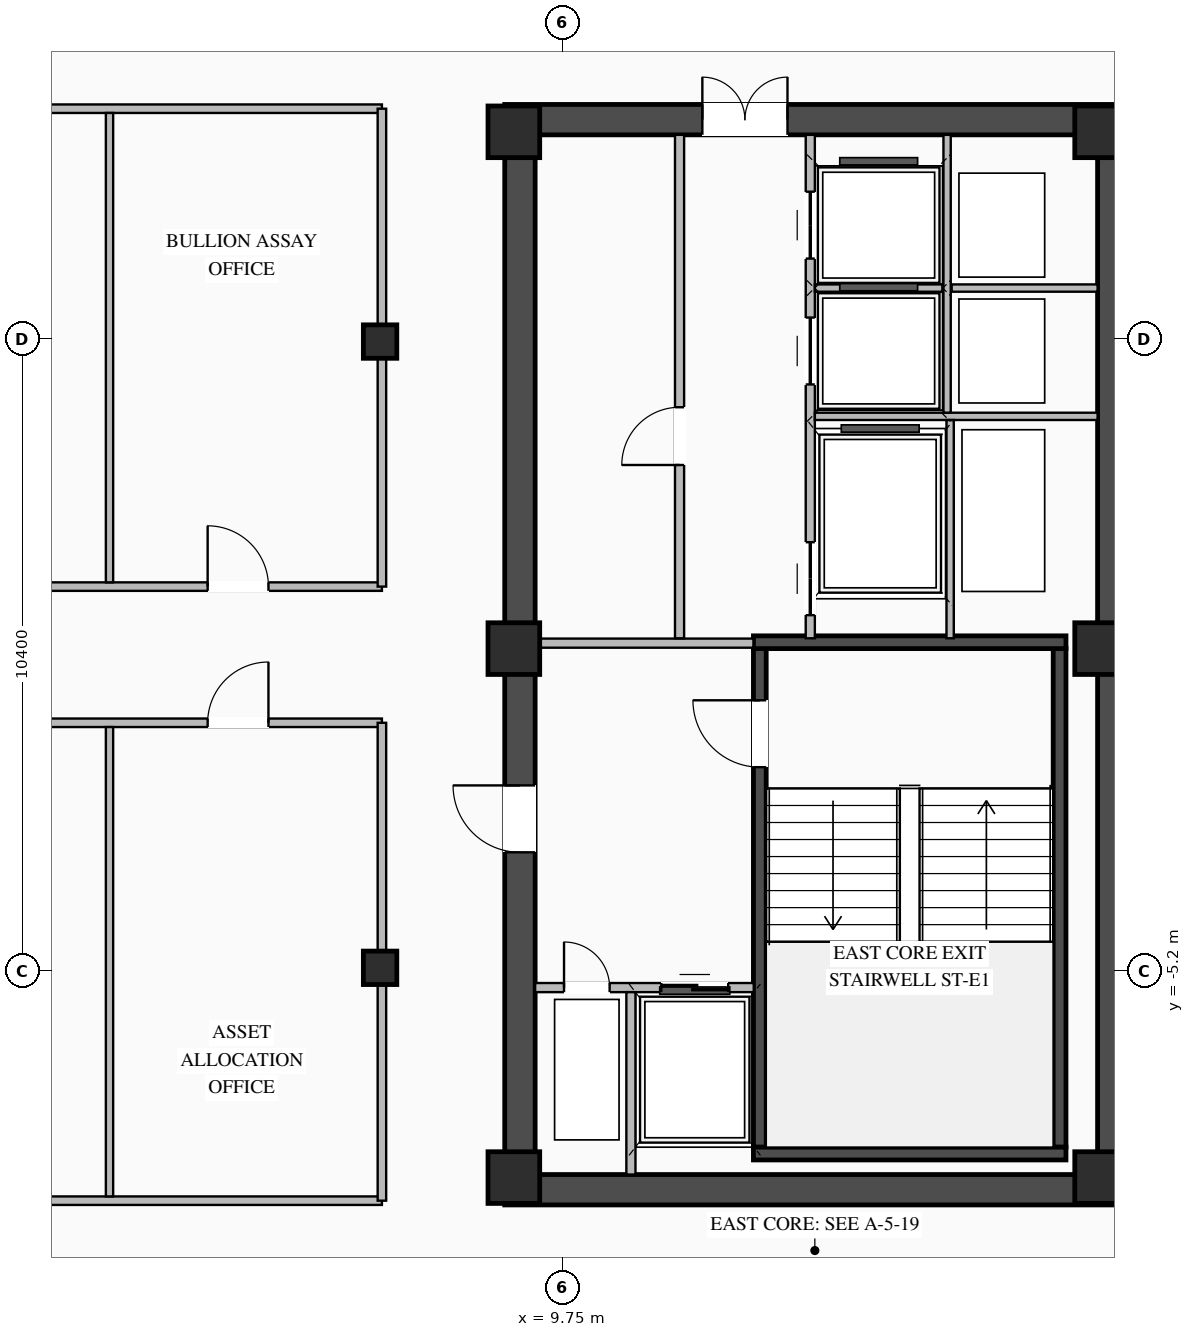
"""IFC4 building model, lengths in metres.
Left out: names, types, materials, properties, quantities, classifications, styles, units other than length and angle.
Written with IfcOpenShell. Run it as: python <this file> out.ifc"""

import sys

from ifc_helpers import new_model, si_unit, direction, frame, frame_2d, origin, origin_2d, place, context, subcontext, project, spatial, rectangle, i_section, extrude, element, fill, save


model = new_model("IFC4")
c1 = context("Model", 3, precision=1e-05, world=origin(), true_north=direction((0.0, 1.0)))
c2 = subcontext(c1, "Body", "Model", "MODEL_VIEW")
j1 = project(units=[si_unit("LENGTHUNIT", "METRE"), si_unit("PLANEANGLEUNIT", "RADIAN")], contexts=[c1])
p1 = place(None, origin())
s1 = spatial("IfcSite", under=j1, at=p1, CompositionType="ELEMENT")
p2 = place(p1, origin())
s2 = spatial("IfcBuilding", under=s1, at=p2, CompositionType="ELEMENT")
p3 = place(p2, frame((0.0, 0.0, 229.2)))
s3 = spatial("IfcBuildingStorey", under=s2, at=p3, CompositionType="ELEMENT", Elevation=229.2)
p4 = place(p3, frame((8.8, -8.8, 0.0), z_axis=(0.0, 0.0, 1.0), x_axis=(1.0, 0.0, 0.0)))
e1 = element("IfcWall", 1, at=p4, inside=s3, PredefinedType="SHEAR", context=c2, shape_type="SweptSolid", body=[
    extrude(rectangle(XDim=10.25, YDim=0.5, at=frame_2d((5.125, 0.0))), origin(), (0.0, 0.0, 1.0), 3.27),
])
p5 = place(p3, frame((8.8, 8.8, 0.0), z_axis=(0.0, 0.0, 1.0), x_axis=(1.0, 0.0, 0.0)))
e2 = element("IfcWall", 2, at=p5, inside=s3, PredefinedType="SHEAR", context=c2, shape_type="SweptSolid", body=[
    extrude(rectangle(XDim=10.25, YDim=0.5, at=frame_2d((5.125, 0.0))), origin(), (0.0, 0.0, 1.0), 3.27),
])
p6 = place(p5, frame((3.25, 0.0, 0.0)))
e3 = element("IfcOpeningElement", 3, at=p6, cuts=e2, PredefinedType="OPENING", context=c2, shape_type="SweptSolid", body=[
    extrude(rectangle(XDim=1.4, YDim=2.05, at=frame_2d((0.7, 1.025))), frame((0.0, 0.26, 0.0), z_axis=(0.0, -1.0, 0.0), x_axis=(1.0, 0.0, 0.0)), (0.0, 0.0, 1.0), 0.52),
])
p7 = place(p3, frame((9.05, -8.55, 0.0), z_axis=(0.0, 0.0, 1.0), x_axis=(0.0, 1.0, 0.0)))
e4 = element("IfcWall", 4, at=p7, inside=s3, PredefinedType="SHEAR", context=c2, shape_type="SweptSolid", body=[
    extrude(rectangle(XDim=17.1, YDim=0.5, at=frame_2d((8.55, 0.0))), origin(), (0.0, 0.0, 1.0), 3.27),
])
p8 = place(p7, frame((5.3, 0.0, 0.0)))
e5 = element("IfcOpeningElement", 5, at=p8, cuts=e4, PredefinedType="OPENING", context=c2, shape_type="SweptSolid", body=[
    extrude(rectangle(XDim=1.1, YDim=2.08, at=frame_2d((0.55, 1.04))), frame((0.0, 0.26, 0.0), z_axis=(0.0, -1.0, 0.0), x_axis=(1.0, 0.0, 0.0)), (0.0, 0.0, 1.0), 0.52),
])
p9 = place(p3, frame((18.8, -8.55, 0.0), z_axis=(0.0, 0.0, 1.0), x_axis=(0.0, 1.0, 0.0)))
e6 = element("IfcWall", 6, at=p9, inside=s3, PredefinedType="SHEAR", context=c2, shape_type="SweptSolid", body=[
    extrude(rectangle(XDim=17.1, YDim=0.5, at=frame_2d((8.55, 0.0))), origin(), (0.0, 0.0, 1.0), 3.27),
])
p10 = place(p3, frame((12.995, -8.1, 0.0), z_axis=(0.0, 0.0, 1.0), x_axis=(0.0, 1.0, 0.0)))
e7 = element("IfcWall", 7, at=p10, inside=s3, PredefinedType="SHEAR", context=c2, shape_type="SweptSolid", body=[
    extrude(rectangle(XDim=8.2, YDim=0.21, at=frame_2d((4.1, 0.0))), origin(), (0.0, 0.0, 1.0), 3.27),
])
p11 = place(p10, frame((6.25, 0.0, 0.0)))
e8 = element("IfcOpeningElement", 8, at=p11, cuts=e7, PredefinedType="OPENING", context=c2, shape_type="SweptSolid", body=[
    extrude(rectangle(XDim=1.1, YDim=2.15, at=frame_2d((0.55, 1.075))), frame((0.0, 0.115, 0.0), z_axis=(0.0, -1.0, 0.0), x_axis=(1.0, 0.0, 0.0)), (0.0, 0.0, 1.0), 0.23),
])
p12 = place(p3, frame((17.925, -8.1, 0.0), z_axis=(0.0, 0.0, 1.0), x_axis=(0.0, 1.0, 0.0)))
e9 = element("IfcWall", 9, at=p12, inside=s3, PredefinedType="SHEAR", context=c2, shape_type="SweptSolid", body=[
    extrude(rectangle(XDim=8.2, YDim=0.21, at=frame_2d((4.1, 0.0))), origin(), (0.0, 0.0, 1.0), 3.27),
])
for number, where, z_axis, x_axis in (
    (10, (12.89, -8.205, 0.0), (0.0, 0.0, 1.0), (1.0, 0.0, 0.0)),
    (11, (18.03, 0.205, 0.0), (0.0, 0.0, 1.0), (-1.0, 0.0, 0.0)),
):
    element("IfcWall", number, at=place(p3, frame(where, z_axis=z_axis, x_axis=x_axis)), inside=s3, PredefinedType="SHEAR", context=c2, shape_type="SweptSolid", body=[
        extrude(rectangle(XDim=5.14, YDim=0.21, at=frame_2d((2.57, 0.0))), origin(), (0.0, 0.0, 1.0), 3.27),
    ])
for number, where, z_axis, x_axis in (
    (12, (8.95, -8.6, 0.0), (0.0, 0.0, 1.0), (1.0, 0.0, 0.0)),
    (13, (8.95, 0.1, 0.0), (0.0, 0.0, 1.0), (1.0, 0.0, 0.0)),
    (14, (8.95, 8.6, 0.0), (0.0, 0.0, 1.0), (1.0, 0.0, 0.0)),
    (15, (18.6, -8.6, 0.0), (0.0, 0.0, 1.0), (1.0, 0.0, 0.0)),
    (16, (18.6, 0.1, 0.0), (0.0, 0.0, 1.0), (1.0, 0.0, 0.0)),
    (17, (18.6, 8.6, 0.0), (0.0, 0.0, 1.0), (1.0, 0.0, 0.0)),
):
    element("IfcColumn", number, at=place(p3, frame(where, z_axis=z_axis, x_axis=x_axis)), inside=s3, PredefinedType="COLUMN", context=c2, shape_type="SweptSolid", body=[
        extrude(rectangle(XDim=0.85, YDim=0.85, at=origin_2d()), origin(), (0.0, 0.0, 1.0), 3.45),
    ])
for number, where, z_axis, x_axis in (
    (18, (6.75, -5.15, 0.0), (0.0, 0.0, 1.0), (1.0, 0.0, 0.0)),
    (19, (6.75, 5.15, 0.0), (0.0, 0.0, 1.0), (1.0, 0.0, 0.0)),
):
    element("IfcColumn", number, at=place(p3, frame(where, z_axis=z_axis, x_axis=x_axis)), inside=s3, PredefinedType="COLUMN", context=c2, shape_type="SweptSolid", body=[
        extrude(i_section(OverallWidth=0.55, OverallDepth=0.55, WebThickness=0.024, FlangeThickness=0.036, at=origin_2d()), origin(), (0.0, 0.0, 1.0), 3.45),
    ])
p13 = place(p3, frame((9.3, -5.475, 0.0), z_axis=(0.0, 0.0, 1.0), x_axis=(1.0, 0.0, 0.0)))
e20 = element("IfcWall", 20, at=p13, inside=s3, PredefinedType="STANDARD", context=c2, shape_type="SweptSolid", body=[
    extrude(rectangle(XDim=3.595, YDim=0.15, at=frame_2d((1.797, 0.0))), origin(), (0.0, 0.0, 1.0), 3.25),
])
p14 = place(p13, frame((2.075, 0.0, 0.0)))
e21 = element("IfcOpeningElement", 21, at=p14, cuts=e20, PredefinedType="OPENING", context=c2, shape_type="SweptSolid", body=[
    extrude(rectangle(XDim=1.1, YDim=2.15, at=frame_2d((0.55, 1.075))), frame((0.0, 0.085, 0.0), z_axis=(0.0, -1.0, 0.0), x_axis=(1.0, 0.0, 0.0)), (0.0, 0.0, 1.0), 0.17),
])
p15 = place(p13, frame((0.475, 0.0, 0.0)))
e22 = element("IfcOpeningElement", 22, at=p15, cuts=e20, PredefinedType="OPENING", context=c2, shape_type="SweptSolid", body=[
    extrude(rectangle(XDim=0.75, YDim=2.05, at=frame_2d((0.375, 1.025))), frame((0.0, 0.085, 0.0), z_axis=(0.0, -1.0, 0.0), x_axis=(1.0, 0.0, 0.0)), (0.0, 0.0, 1.0), 0.17),
])
p16 = place(p3, frame((10.875, -8.55, 0.0), z_axis=(0.0, 0.0, 1.0), x_axis=(0.0, 1.0, 0.0)))
e23 = element("IfcWall", 23, at=p16, inside=s3, PredefinedType="STANDARD", context=c2, shape_type="SweptSolid", body=[
    extrude(rectangle(XDim=3.0, YDim=0.15, at=frame_2d((1.5, 0.0))), origin(), (0.0, 0.0, 1.0), 3.25),
])
p17 = place(p3, frame((9.3, 0.19, 0.0), z_axis=(0.0, 0.0, 1.0), x_axis=(1.0, 0.0, 0.0)))
e24 = element("IfcWall", 24, at=p17, inside=s3, PredefinedType="STANDARD", context=c2, shape_type="SweptSolid", body=[
    extrude(rectangle(XDim=3.59, YDim=0.15, at=frame_2d((1.795, 0.0))), origin(), (0.0, 0.0, 1.0), 2.645),
])
p18 = place(p3, frame((11.675, 0.27, 0.0), z_axis=(0.0, 0.0, 1.0), x_axis=(0.0, 1.0, 0.0)))
e25 = element("IfcWall", 25, at=p18, inside=s3, PredefinedType="STANDARD", context=c2, shape_type="SweptSolid", body=[
    extrude(rectangle(XDim=8.28, YDim=0.15, at=frame_2d((4.14, 0.0))), origin(), (0.0, 0.0, 1.0), 3.25),
])
p19 = place(p18, frame((2.85, 0.0, 0.0)))
e26 = element("IfcOpeningElement", 26, at=p19, cuts=e25, PredefinedType="OPENING", context=c2, shape_type="SweptSolid", body=[
    extrude(rectangle(XDim=0.95, YDim=2.05, at=frame_2d((0.475, 1.025))), frame((0.0, 0.085, 0.0), z_axis=(0.0, -1.0, 0.0), x_axis=(1.0, 0.0, 0.0)), (0.0, 0.0, 1.0), 0.17),
])
p20 = place(p3, frame((13.825, 0.27, 0.0), z_axis=(0.0, 0.0, 1.0), x_axis=(0.0, 1.0, 0.0)))
e27 = element("IfcWall", 27, at=p20, inside=s3, PredefinedType="STANDARD", context=c2, shape_type="SweptSolid", body=[
    extrude(rectangle(XDim=8.28, YDim=0.15, at=frame_2d((4.14, 0.0))), origin(), (0.0, 0.0, 1.0), 3.25),
])
p21 = place(p20, frame((4.175, 0.0, 0.0)))
e28 = element("IfcOpeningElement", 28, at=p21, cuts=e27, PredefinedType="OPENING", context=c2, shape_type="SweptSolid", body=[
    extrude(rectangle(XDim=1.1, YDim=2.1, at=frame_2d((0.55, 1.05))), frame((0.0, 0.085, 0.0), z_axis=(0.0, -1.0, 0.0), x_axis=(1.0, 0.0, 0.0)), (0.0, 0.0, 1.0), 0.17),
])
p22 = place(p20, frame((6.245, 0.0, 0.0)))
e29 = element("IfcOpeningElement", 29, at=p22, cuts=e27, PredefinedType="OPENING", context=c2, shape_type="SweptSolid", body=[
    extrude(rectangle(XDim=1.1, YDim=2.1, at=frame_2d((0.55, 1.05))), frame((0.0, 0.085, 0.0), z_axis=(0.0, -1.0, 0.0), x_axis=(1.0, 0.0, 0.0)), (0.0, 0.0, 1.0), 0.17),
])
p23 = place(p20, frame((0.38, 0.0, 0.0)))
e30 = element("IfcOpeningElement", 30, at=p23, cuts=e27, PredefinedType="OPENING", context=c2, shape_type="SweptSolid", body=[
    extrude(rectangle(XDim=1.2, YDim=2.1, at=frame_2d((0.6, 1.05))), frame((0.0, 0.085, 0.0), z_axis=(0.0, -1.0, 0.0), x_axis=(1.0, 0.0, 0.0)), (0.0, 0.0, 1.0), 0.17),
])
p24 = place(p3, frame((13.9, 3.92, 0.0), z_axis=(0.0, 0.0, 1.0), x_axis=(1.0, 0.0, 0.0)))
e31 = element("IfcWall", 31, at=p24, inside=s3, PredefinedType="STANDARD", context=c2, shape_type="SweptSolid", body=[
    extrude(rectangle(XDim=4.65, YDim=0.12, at=frame_2d((2.325, 0.0))), origin(), (0.0, 0.0, 1.0), 3.25),
])
p25 = place(p3, frame((16.15, 6.03, 0.0), z_axis=(0.0, 0.0, 1.0), x_axis=(1.0, 0.0, 0.0)))
e32 = element("IfcWall", 32, at=p25, inside=s3, PredefinedType="STANDARD", context=c2, shape_type="SweptSolid", body=[
    extrude(rectangle(XDim=2.4, YDim=0.12, at=frame_2d((1.2, 0.0))), origin(), (0.0, 0.0, 1.0), 3.25),
])
p26 = place(p3, frame((16.075, 3.98, 0.0), z_axis=(0.0, 0.0, 1.0), x_axis=(0.0, 1.0, 0.0)))
e33 = element("IfcWall", 33, at=p26, inside=s3, PredefinedType="STANDARD", context=c2, shape_type="SweptSolid", body=[
    extrude(rectangle(XDim=4.57, YDim=0.12, at=frame_2d((2.285, 0.0))), origin(), (0.0, 0.0, 1.0), 3.25),
])
p27 = place(p3, frame((13.9, 6.03, 0.0), z_axis=(0.0, 0.0, 1.0), x_axis=(1.0, 0.0, 0.0)))
e34 = element("IfcWall", 34, at=p27, inside=s3, PredefinedType="STANDARD", context=c2, shape_type="SweptSolid", body=[
    extrude(rectangle(XDim=2.1, YDim=0.12, at=frame_2d((1.05, 0.0))), origin(), (0.0, 0.0, 1.0), 3.25),
])
p28 = place(p3, frame((16.125, 0.27, 0.0), z_axis=(0.0, 0.0, 1.0), x_axis=(0.0, 1.0, 0.0)))
e35 = element("IfcWall", 35, at=p28, inside=s3, PredefinedType="STANDARD", context=c2, shape_type="SweptSolid", body=[
    extrude(rectangle(XDim=3.59, YDim=0.12, at=frame_2d((1.795, 0.0))), origin(), (0.0, 0.0, 1.0), 3.25),
])
p29 = place(p3, frame((-6.78, 1.12, 0.0), z_axis=(0.0, 0.0, 1.0), x_axis=(1.0, 0.0, 0.0)))
e36 = element("IfcWall", 36, at=p29, inside=s3, PredefinedType="STANDARD", context=c2, shape_type="SweptSolid", body=[
    extrude(rectangle(XDim=13.56, YDim=0.14, at=frame_2d((6.78, 0.0))), origin(), (0.0, 0.0, 1.0), 3.25),
])
p30 = place(p29, frame((1.866, 0.0, 0.0)))
e37 = element("IfcOpeningElement", 37, at=p30, cuts=e36, PredefinedType="OPENING", context=c2, shape_type="SweptSolid", body=[
    extrude(rectangle(XDim=1.0, YDim=2.08, at=frame_2d((0.5, 1.04))), frame((0.0, 0.08, 0.0), z_axis=(0.0, -1.0, 0.0), x_axis=(1.0, 0.0, 0.0)), (0.0, 0.0, 1.0), 0.16),
])
p31 = place(p29, frame((6.28, 0.0, 0.0)))
e38 = element("IfcOpeningElement", 38, at=p31, cuts=e36, PredefinedType="OPENING", context=c2, shape_type="SweptSolid", body=[
    extrude(rectangle(XDim=1.0, YDim=2.08, at=frame_2d((0.5, 1.04))), frame((0.0, 0.08, 0.0), z_axis=(0.0, -1.0, 0.0), x_axis=(1.0, 0.0, 0.0)), (0.0, 0.0, 1.0), 0.16),
])
p32 = place(p29, frame((10.694, 0.0, 0.0)))
e39 = element("IfcOpeningElement", 39, at=p32, cuts=e36, PredefinedType="OPENING", context=c2, shape_type="SweptSolid", body=[
    extrude(rectangle(XDim=1.0, YDim=2.08, at=frame_2d((0.5, 1.04))), frame((0.0, 0.08, 0.0), z_axis=(0.0, -1.0, 0.0), x_axis=(1.0, 0.0, 0.0)), (0.0, 0.0, 1.0), 0.16),
])
p33 = place(p3, frame((-6.78, 8.98, 0.0), z_axis=(0.0, 0.0, 1.0), x_axis=(1.0, 0.0, 0.0)))
e40 = element("IfcWall", 40, at=p33, inside=s3, PredefinedType="STANDARD", context=c2, shape_type="SweptSolid", body=[
    extrude(rectangle(XDim=13.56, YDim=0.14, at=frame_2d((6.78, 0.0))), origin(), (0.0, 0.0, 1.0), 3.25),
])
p34 = place(p3, frame((6.78, 1.12, 0.0), z_axis=(0.0, 0.0, 1.0), x_axis=(0.0, 1.0, 0.0)))
e41 = element("IfcWall", 41, at=p34, inside=s3, PredefinedType="STANDARD", context=c2, shape_type="SweptSolid", body=[
    extrude(rectangle(XDim=7.86, YDim=0.14, at=frame_2d((3.93, 0.0))), origin(), (0.0, 0.0, 1.0), 2.645),
])
p35 = place(p3, frame((2.3, 1.19, 0.0), z_axis=(0.0, 0.0, 1.0), x_axis=(0.0, 1.0, 0.0)))
e42 = element("IfcWall", 42, at=p35, inside=s3, PredefinedType="STANDARD", context=c2, shape_type="SweptSolid", body=[
    extrude(rectangle(XDim=7.72, YDim=0.12, at=frame_2d((3.86, 0.0))), origin(), (0.0, 0.0, 1.0), 3.25),
])
p36 = place(p3, frame((-6.78, -1.12, 0.0), z_axis=(0.0, 0.0, 1.0), x_axis=(1.0, 0.0, 0.0)))
e43 = element("IfcWall", 43, at=p36, inside=s3, PredefinedType="STANDARD", context=c2, shape_type="SweptSolid", body=[
    extrude(rectangle(XDim=13.56, YDim=0.14, at=frame_2d((6.78, 0.0))), origin(), (0.0, 0.0, 1.0), 3.25),
])
p37 = place(p36, frame((1.866, 0.0, 0.0)))
e44 = element("IfcOpeningElement", 44, at=p37, cuts=e43, PredefinedType="OPENING", context=c2, shape_type="SweptSolid", body=[
    extrude(rectangle(XDim=1.0, YDim=2.08, at=frame_2d((0.5, 1.04))), frame((0.0, 0.08, 0.0), z_axis=(0.0, -1.0, 0.0), x_axis=(1.0, 0.0, 0.0)), (0.0, 0.0, 1.0), 0.16),
])
p38 = place(p36, frame((6.28, 0.0, 0.0)))
e45 = element("IfcOpeningElement", 45, at=p38, cuts=e43, PredefinedType="OPENING", context=c2, shape_type="SweptSolid", body=[
    extrude(rectangle(XDim=1.0, YDim=2.08, at=frame_2d((0.5, 1.04))), frame((0.0, 0.08, 0.0), z_axis=(0.0, -1.0, 0.0), x_axis=(1.0, 0.0, 0.0)), (0.0, 0.0, 1.0), 0.16),
])
p39 = place(p36, frame((10.694, 0.0, 0.0)))
e46 = element("IfcOpeningElement", 46, at=p39, cuts=e43, PredefinedType="OPENING", context=c2, shape_type="SweptSolid", body=[
    extrude(rectangle(XDim=1.0, YDim=2.08, at=frame_2d((0.5, 1.04))), frame((0.0, 0.08, 0.0), z_axis=(0.0, -1.0, 0.0), x_axis=(1.0, 0.0, 0.0)), (0.0, 0.0, 1.0), 0.16),
])
p40 = place(p3, frame((-6.78, -8.98, 0.0), z_axis=(0.0, 0.0, 1.0), x_axis=(1.0, 0.0, 0.0)))
e47 = element("IfcWall", 47, at=p40, inside=s3, PredefinedType="STANDARD", context=c2, shape_type="SweptSolid", body=[
    extrude(rectangle(XDim=13.56, YDim=0.14, at=frame_2d((6.78, 0.0))), origin(), (0.0, 0.0, 1.0), 3.25),
])
p41 = place(p3, frame((6.78, -8.98, 0.0), z_axis=(0.0, 0.0, 1.0), x_axis=(0.0, 1.0, 0.0)))
e48 = element("IfcWall", 48, at=p41, inside=s3, PredefinedType="STANDARD", context=c2, shape_type="SweptSolid", body=[
    extrude(rectangle(XDim=7.86, YDim=0.14, at=frame_2d((3.93, 0.0))), origin(), (0.0, 0.0, 1.0), 2.645),
])
p42 = place(p3, frame((2.3, -8.91, 0.0), z_axis=(0.0, 0.0, 1.0), x_axis=(0.0, 1.0, 0.0)))
e49 = element("IfcWall", 49, at=p42, inside=s3, PredefinedType="STANDARD", context=c2, shape_type="SweptSolid", body=[
    extrude(rectangle(XDim=7.72, YDim=0.12, at=frame_2d((3.86, 0.0))), origin(), (0.0, 0.0, 1.0), 3.25),
])
p43 = place(p11, origin())
e50 = element("IfcDoor", 50, at=p43, inside=s3, OperationType="SINGLE_SWING_RIGHT", PredefinedType="DOOR", context=c2, shape_type="SweptSolid", body=[
    extrude(rectangle(XDim=1.1, YDim=2.15, at=frame_2d((0.55, 1.075))), frame((0.0, 0.025, 0.0), z_axis=(0.0, -1.0, 0.0), x_axis=(1.0, 0.0, 0.0)), (0.0, 0.0, 1.0), 0.05),
])
fill(e8, e50)
p44 = place(p14, origin())
e51 = element("IfcDoor", 51, at=p44, inside=s3, OperationType="DOUBLE_DOOR_SLIDING", PredefinedType="DOOR", context=c2, shape_type="SweptSolid", body=[
    extrude(rectangle(XDim=1.1, YDim=2.15, at=frame_2d((0.55, 1.075))), frame((0.0, 0.025, 0.0), z_axis=(0.0, -1.0, 0.0), x_axis=(1.0, 0.0, 0.0)), (0.0, 0.0, 1.0), 0.05),
])
fill(e21, e51)
p45 = place(p15, origin())
e52 = element("IfcDoor", 52, at=p45, inside=s3, OperationType="SINGLE_SWING_LEFT", PredefinedType="DOOR", context=c2, shape_type="SweptSolid", body=[
    extrude(rectangle(XDim=0.75, YDim=2.05, at=frame_2d((0.375, 1.025))), frame((0.0, 0.025, 0.0), z_axis=(0.0, -1.0, 0.0), x_axis=(1.0, 0.0, 0.0)), (0.0, 0.0, 1.0), 0.05),
])
fill(e22, e52)
p46 = place(p8, origin())
e53 = element("IfcDoor", 53, at=p46, inside=s3, OperationType="SINGLE_SWING_RIGHT", PredefinedType="DOOR", context=c2, shape_type="SweptSolid", body=[
    extrude(rectangle(XDim=1.1, YDim=2.08, at=frame_2d((0.55, 1.04))), frame((0.0, -0.155, 0.0), z_axis=(0.0, -1.0, 0.0), x_axis=(1.0, 0.0, 0.0)), (0.0, 0.0, 1.0), 0.05),
])
fill(e5, e53)
p47 = place(p6, origin())
e54 = element("IfcDoor", 54, at=p47, inside=s3, OperationType="DOUBLE_DOOR_SINGLE_SWING", PredefinedType="DOOR", context=c2, shape_type="SweptSolid", body=[
    extrude(rectangle(XDim=1.4, YDim=2.05, at=frame_2d((0.7, 1.025))), frame((0.0, 0.195, 0.0), z_axis=(0.0, -1.0, 0.0), x_axis=(1.0, 0.0, 0.0)), (0.0, 0.0, 1.0), 0.05),
])
fill(e3, e54)
p48 = place(p19, origin())
e55 = element("IfcDoor", 55, at=p48, inside=s3, OperationType="SINGLE_SWING_LEFT", PredefinedType="DOOR", context=c2, shape_type="SweptSolid", body=[
    extrude(rectangle(XDim=0.95, YDim=2.05, at=frame_2d((0.475, 1.025))), frame((0.0, 0.025, 0.0), z_axis=(0.0, -1.0, 0.0), x_axis=(1.0, 0.0, 0.0)), (0.0, 0.0, 1.0), 0.05),
])
fill(e26, e55)
p49 = place(p21, origin())
e56 = element("IfcDoor", 56, at=p49, inside=s3, OperationType="DOUBLE_DOOR_SLIDING", PredefinedType="DOOR", context=c2, shape_type="SweptSolid", body=[
    extrude(rectangle(XDim=1.1, YDim=2.1, at=frame_2d((0.55, 1.05))), frame((0.0, 0.025, 0.0), z_axis=(0.0, -1.0, 0.0), x_axis=(1.0, 0.0, 0.0)), (0.0, 0.0, 1.0), 0.05),
])
fill(e28, e56)
p50 = place(p22, origin())
e57 = element("IfcDoor", 57, at=p50, inside=s3, OperationType="DOUBLE_DOOR_SLIDING", PredefinedType="DOOR", context=c2, shape_type="SweptSolid", body=[
    extrude(rectangle(XDim=1.1, YDim=2.1, at=frame_2d((0.55, 1.05))), frame((0.0, 0.025, 0.0), z_axis=(0.0, -1.0, 0.0), x_axis=(1.0, 0.0, 0.0)), (0.0, 0.0, 1.0), 0.05),
])
fill(e29, e57)
p51 = place(p23, origin())
e58 = element("IfcDoor", 58, at=p51, inside=s3, OperationType="DOUBLE_DOOR_SLIDING", PredefinedType="DOOR", context=c2, shape_type="SweptSolid", body=[
    extrude(rectangle(XDim=1.2, YDim=2.1, at=frame_2d((0.6, 1.05))), frame((0.0, 0.025, 0.0), z_axis=(0.0, -1.0, 0.0), x_axis=(1.0, 0.0, 0.0)), (0.0, 0.0, 1.0), 0.05),
])
fill(e30, e58)
p52 = place(p32, origin())
e59 = element("IfcDoor", 59, at=p52, inside=s3, OperationType="SINGLE_SWING_LEFT", PredefinedType="DOOR", context=c2, shape_type="SweptSolid", body=[
    extrude(rectangle(XDim=1.0, YDim=2.08, at=frame_2d((0.5, 1.04))), frame((0.0, 0.025, 0.0), z_axis=(0.0, -1.0, 0.0), x_axis=(1.0, 0.0, 0.0)), (0.0, 0.0, 1.0), 0.05),
])
fill(e39, e59)
p53 = place(p39, origin())
e60 = element("IfcDoor", 60, at=p53, inside=s3, OperationType="SINGLE_SWING_RIGHT", PredefinedType="DOOR", context=c2, shape_type="SweptSolid", body=[
    extrude(rectangle(XDim=1.0, YDim=2.08, at=frame_2d((0.5, 1.04))), frame((0.0, 0.025, 0.0), z_axis=(0.0, -1.0, 0.0), x_axis=(1.0, 0.0, 0.0)), (0.0, 0.0, 1.0), 0.05),
])
fill(e46, e60)
save(model, sys.argv[1])
